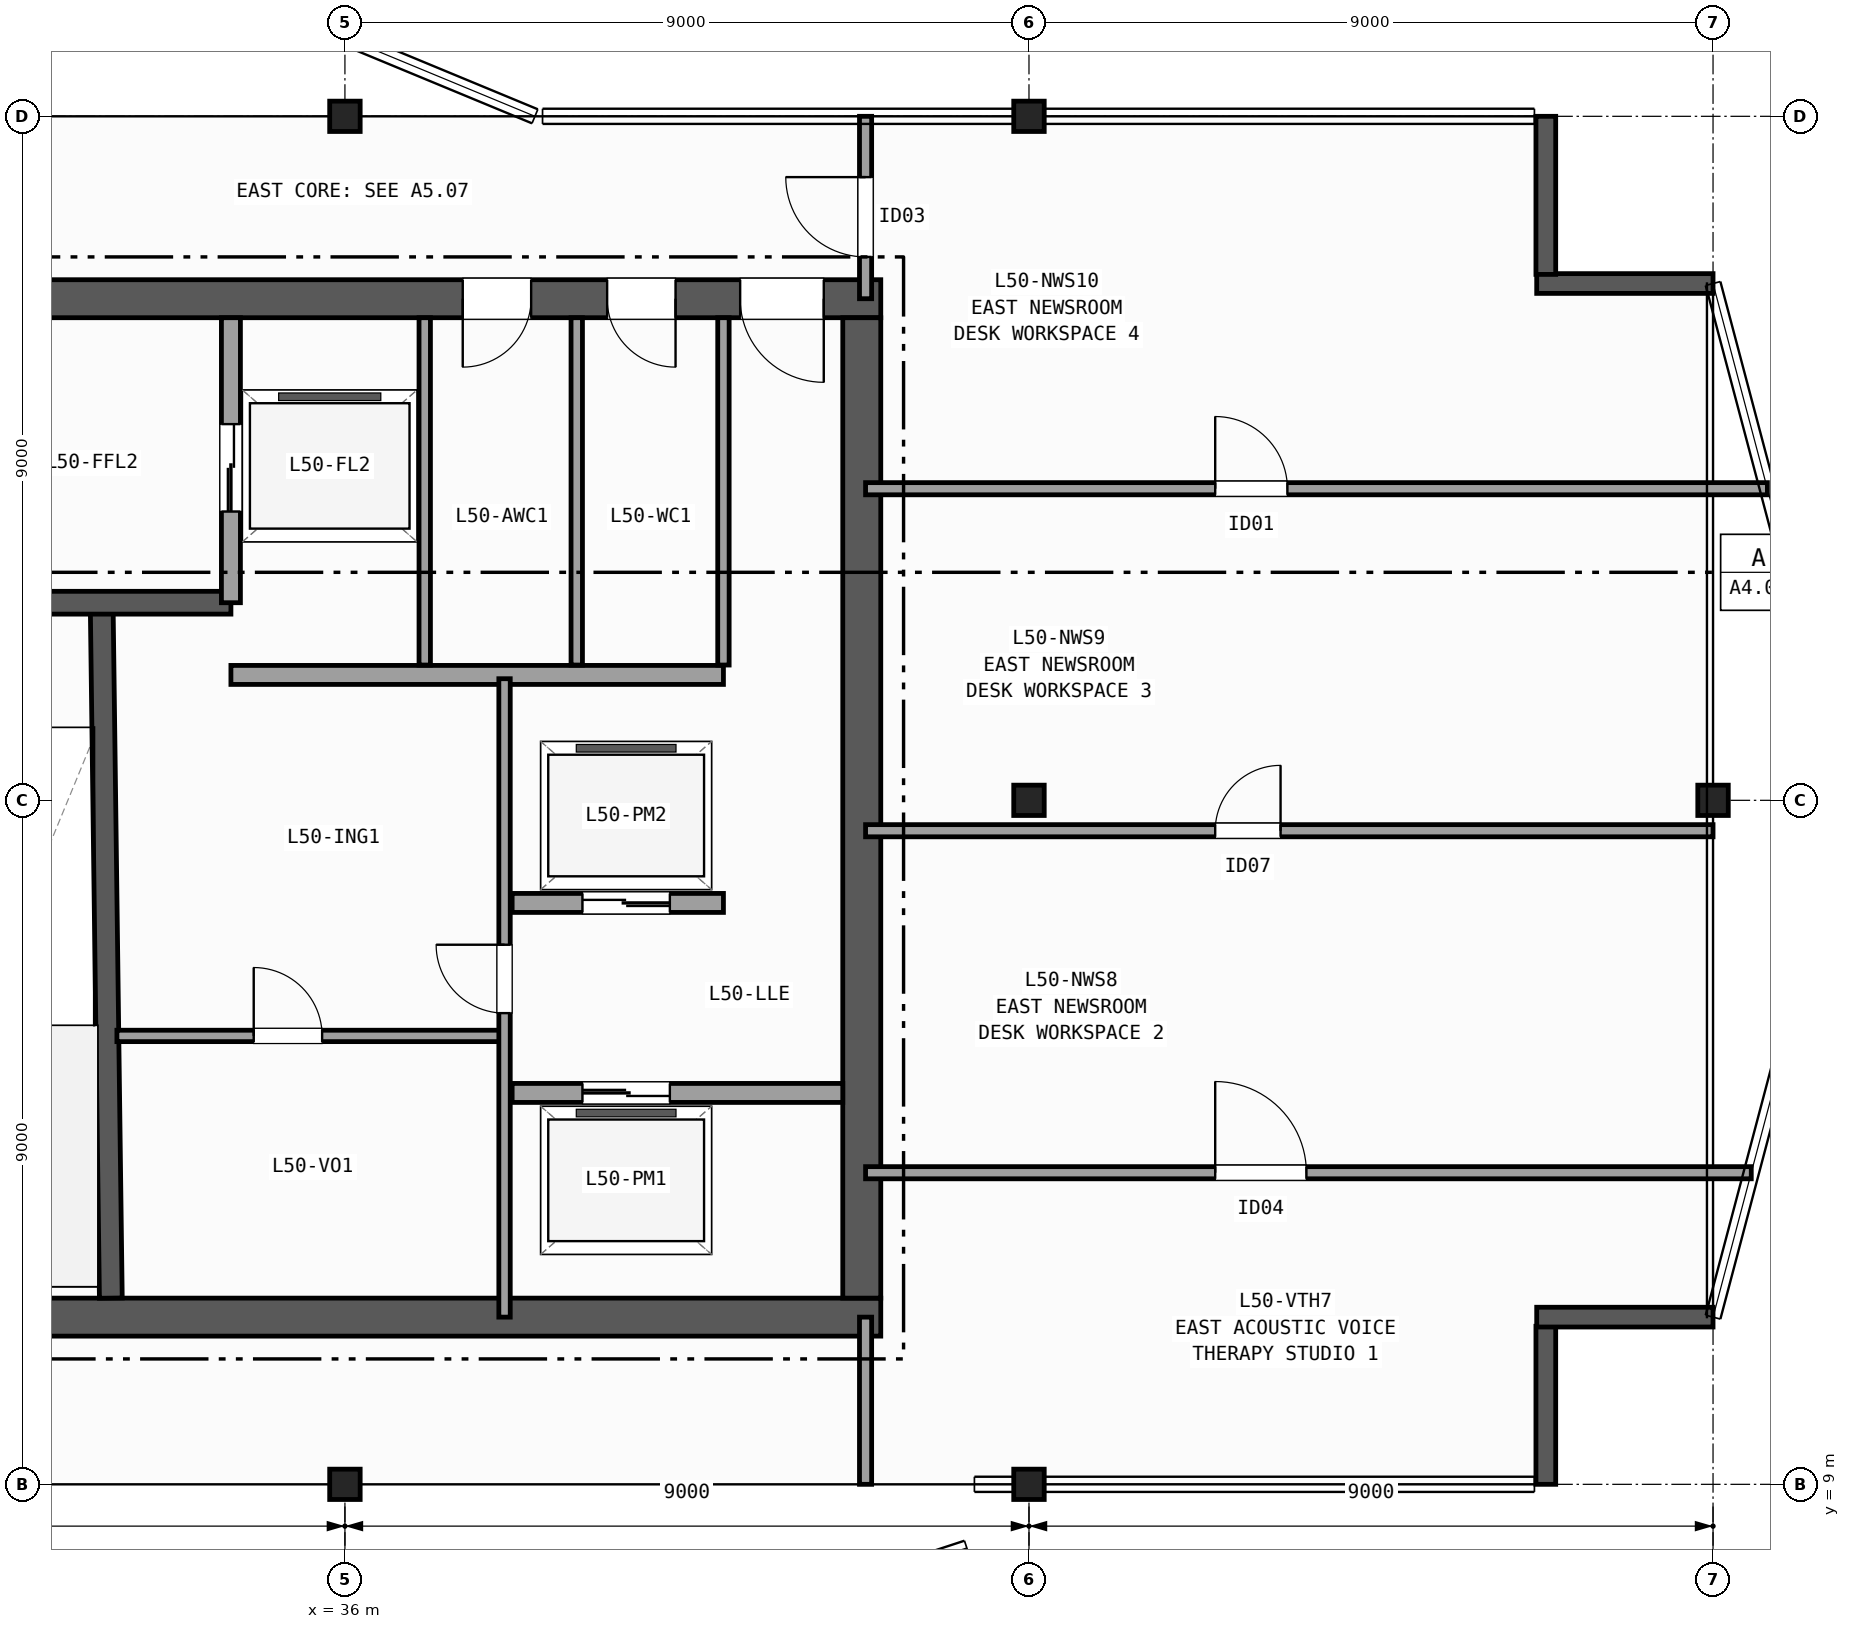
"""IFC4 building model, lengths in metres.
Left out: names, types, materials, properties, quantities, classifications, styles, units other than length and angle.
Written with IfcOpenShell. Run it as: python <this file> out.ifc"""

import sys

from ifc_helpers import new_model, si_unit, direction, frame, frame_2d, origin, origin_2d, place, context, subcontext, project, spatial, rectangle, i_section, extrude, element, fill, save


model = new_model("IFC4")
c1 = context("Model", 3, precision=1e-05, world=origin(), true_north=direction((0.0, 1.0)))
c2 = subcontext(c1, "Body", "Model", "MODEL_VIEW")
j1 = project(units=[si_unit("LENGTHUNIT", "METRE"), si_unit("PLANEANGLEUNIT", "RADIAN")], contexts=[c1])
p1 = place(None, origin())
s1 = spatial("IfcSite", under=j1, at=p1, CompositionType="ELEMENT")
p2 = place(p1, origin())
s2 = spatial("IfcBuilding", under=s1, at=p2, CompositionType="ELEMENT")
p3 = place(p2, frame((0.0, 0.0, 201.2)))
s3 = spatial("IfcBuildingStorey", under=s2, at=p3, CompositionType="ELEMENT", Elevation=201.2)
for number, where, z_axis, x_axis in (
    (1, (36.0, 9.0, 0.0), (0.0, 0.0, 1.0), (1.0, 0.0, 0.0)),
    (2, (36.0, 27.0, 0.0), (0.0, 0.0, 1.0), (1.0, 0.0, 0.0)),
    (3, (45.0, 9.0, 0.0), (0.0, 0.0, 1.0), (1.0, 0.0, 0.0)),
    (4, (45.0, 18.0, 0.0), (0.0, 0.0, 1.0), (1.0, 0.0, 0.0)),
    (5, (45.0, 27.0, 0.0), (0.0, 0.0, 1.0), (1.0, 0.0, 0.0)),
    (6, (54.0, 18.0, 0.0), (0.0, 0.0, 1.0), (1.0, 0.0, 0.0)),
):
    element("IfcColumn", number, at=place(p3, frame(where, z_axis=z_axis, x_axis=x_axis)), inside=s3, PredefinedType="COLUMN", context=c2, shape_type="SweptSolid", body=[
        extrude(i_section(OverallWidth=0.401, OverallDepth=0.399, WebThickness=0.025, FlangeThickness=0.04, FilletRadius=0.015, at=origin_2d()), origin(), (0.0, 0.0, 1.0), 5.0),
    ])
p4 = place(p3, frame((51.8, 9.0, 0.0), z_axis=(0.0, 0.0, 1.0), x_axis=(0.0, 1.0, 0.0)))
e7 = element("IfcWall", 7, at=p4, inside=s3, PredefinedType="SOLIDWALL", context=c2, shape_type="SweptSolid", body=[
    extrude(rectangle(XDim=2.08, YDim=0.26, at=frame_2d((1.04, 0.0))), origin(), (0.0, 0.0, 1.0), 4.72),
])
for number, where, z_axis, x_axis in (
    (8, (51.68, 11.2, 0.0), (0.0, 0.0, 1.0), (1.0, 0.0, 0.0)),
    (9, (54.0, 24.8, 0.0), (0.0, 0.0, 1.0), (-1.0, 0.0, 0.0)),
):
    element("IfcWall", number, at=place(p3, frame(where, z_axis=z_axis, x_axis=x_axis)), inside=s3, PredefinedType="SOLIDWALL", context=c2, shape_type="SweptSolid", body=[
        extrude(rectangle(XDim=2.32, YDim=0.26, at=frame_2d((1.16, 0.0))), origin(), (0.0, 0.0, 1.0), 4.72),
    ])
p5 = place(p3, frame((51.8, 24.92, 0.0), z_axis=(0.0, 0.0, 1.0), x_axis=(0.0, 1.0, 0.0)))
e10 = element("IfcWall", 10, at=p5, inside=s3, PredefinedType="SOLIDWALL", context=c2, shape_type="SweptSolid", body=[
    extrude(rectangle(XDim=2.08, YDim=0.26, at=frame_2d((1.04, 0.0))), origin(), (0.0, 0.0, 1.0), 4.72),
])
p6 = place(p3, frame((29.15, 11.2, 0.0), z_axis=(0.0, 0.0, 1.0), x_axis=(1.0, 0.0, 0.0)))
e11 = element("IfcWall", 11, at=p6, inside=s3, PredefinedType="SHEAR", context=c2, shape_type="SweptSolid", body=[
    extrude(rectangle(XDim=13.9, YDim=0.5, at=frame_2d((6.95, 0.0))), origin(), (0.0, 0.0, 1.0), 4.72),
])
p7 = place(p3, frame((43.05, 24.6, 0.0), z_axis=(0.0, 0.0, 1.0), x_axis=(-1.0, 0.0, 0.0)))
e12 = element("IfcWall", 12, at=p7, inside=s3, PredefinedType="SHEAR", context=c2, shape_type="SweptSolid", body=[
    extrude(rectangle(XDim=13.9, YDim=0.5, at=frame_2d((6.95, 0.0))), origin(), (0.0, 0.0, 1.0), 4.72),
])
p8 = place(p7, frame((0.75, 0.0, 0.0)))
e13 = element("IfcOpeningElement", 13, at=p8, cuts=e12, PredefinedType="OPENING", context=c2, shape_type="SweptSolid", body=[
    extrude(rectangle(XDim=1.1, YDim=2.15, at=frame_2d((0.55, 1.075))), frame((0.0, 0.26, 0.0), z_axis=(0.0, -1.0, 0.0), x_axis=(1.0, 0.0, 0.0)), (0.0, 0.0, 1.0), 0.52),
])
p9 = place(p7, frame((2.7, 0.0, 0.0)))
e14 = element("IfcOpeningElement", 14, at=p9, cuts=e12, PredefinedType="OPENING", context=c2, shape_type="SweptSolid", body=[
    extrude(rectangle(XDim=0.9, YDim=2.1, at=frame_2d((0.45, 1.05))), frame((0.0, 0.26, 0.0), z_axis=(0.0, -1.0, 0.0), x_axis=(1.0, 0.0, 0.0)), (0.0, 0.0, 1.0), 0.52),
])
p10 = place(p7, frame((4.6, 0.0, 0.0)))
e15 = element("IfcOpeningElement", 15, at=p10, cuts=e12, PredefinedType="OPENING", context=c2, shape_type="SweptSolid", body=[
    extrude(rectangle(XDim=0.9, YDim=2.1, at=frame_2d((0.45, 1.05))), frame((0.0, 0.26, 0.0), z_axis=(0.0, -1.0, 0.0), x_axis=(1.0, 0.0, 0.0)), (0.0, 0.0, 1.0), 0.52),
])
p11 = place(p3, frame((42.8, 11.45, 0.0), z_axis=(0.0, 0.0, 1.0), x_axis=(0.0, 1.0, 0.0)))
e16 = element("IfcWall", 16, at=p11, inside=s3, PredefinedType="SHEAR", context=c2, shape_type="SweptSolid", body=[
    extrude(rectangle(XDim=12.9, YDim=0.5, at=frame_2d((6.45, 0.0))), origin(), (0.0, 0.0, 1.0), 4.72),
])
p12 = place(p3, frame((32.92, 11.45, 0.0), z_axis=(0.0, 0.0, 1.0), x_axis=(-0.013171578211, 0.999913251001, 0.0)))
e17 = element("IfcWall", 17, at=p12, inside=s3, PredefinedType="SHEAR", context=c2, shape_type="SweptSolid", body=[
    extrude(rectangle(XDim=9.101, YDim=0.3, at=frame_2d((4.55, 0.0))), origin(), (0.0, 0.0, 1.0), 4.72),
])
p13 = place(p3, frame((34.5, 20.6, 0.0), z_axis=(0.0, 0.0, 1.0), x_axis=(-1.0, 0.0, 0.0)))
e18 = element("IfcWall", 18, at=p13, inside=s3, PredefinedType="SHEAR", context=c2, shape_type="SweptSolid", body=[
    extrude(rectangle(XDim=4.85, YDim=0.3, at=frame_2d((2.425, 0.0))), origin(), (0.0, 0.0, 1.0), 4.72),
])
p14 = place(p13, frame((2.7, 0.0, 0.0)))
e19 = element("IfcOpeningElement", 19, at=p14, cuts=e18, PredefinedType="OPENING", context=c2, shape_type="SweptSolid", body=[
    extrude(rectangle(XDim=1.2, YDim=2.15, at=frame_2d((0.6, 1.075))), frame((0.0, 0.16, 0.0), z_axis=(0.0, -1.0, 0.0), x_axis=(1.0, 0.0, 0.0)), (0.0, 0.0, 1.0), 0.32),
])
p15 = place(p3, frame((34.5, 20.6, 0.0), z_axis=(0.0, 0.0, 1.0), x_axis=(0.0, 1.0, 0.0)))
e20 = element("IfcWall", 20, at=p15, inside=s3, PredefinedType="PARTITIONING", context=c2, shape_type="SweptSolid", body=[
    extrude(rectangle(XDim=3.75, YDim=0.25, at=frame_2d((1.875, 0.0))), origin(), (0.0, 0.0, 1.0), 4.72),
])
p16 = place(p15, frame((1.2, 0.0, 0.0)))
e21 = element("IfcOpeningElement", 21, at=p16, cuts=e20, PredefinedType="OPENING", context=c2, shape_type="SweptSolid", body=[
    extrude(rectangle(XDim=1.15, YDim=2.15, at=frame_2d((0.575, 1.075))), frame((0.0, 0.135, 0.0), z_axis=(0.0, -1.0, 0.0), x_axis=(1.0, 0.0, 0.0)), (0.0, 0.0, 1.0), 0.27),
])
p17 = place(p3, frame((34.5, 19.65, 0.0), z_axis=(0.0, 0.0, 1.0), x_axis=(1.0, 0.0, 0.0)))
e22 = element("IfcWall", 22, at=p17, inside=s3, PredefinedType="PARTITIONING", context=c2, shape_type="SweptSolid", body=[
    extrude(rectangle(XDim=6.48, YDim=0.25, at=frame_2d((3.24, 0.0))), origin(), (0.0, 0.0, 1.0), 4.72),
])
p18 = place(p3, frame((38.2, 14.15, 0.0), z_axis=(0.0, 0.0, 1.0), x_axis=(1.0, 0.0, 0.0)))
e23 = element("IfcWall", 23, at=p18, inside=s3, PredefinedType="PARTITIONING", context=c2, shape_type="SweptSolid", body=[
    extrude(rectangle(XDim=4.35, YDim=0.25, at=frame_2d((2.175, 0.0))), origin(), (0.0, 0.0, 1.0), 4.72),
])
p19 = place(p18, frame((0.925, 0.0, 0.0)))
e24 = element("IfcOpeningElement", 24, at=p19, cuts=e23, PredefinedType="OPENING", context=c2, shape_type="SweptSolid", body=[
    extrude(rectangle(XDim=1.15, YDim=2.15, at=frame_2d((0.575, 1.075))), frame((0.0, 0.135, 0.0), z_axis=(0.0, -1.0, 0.0), x_axis=(1.0, 0.0, 0.0)), (0.0, 0.0, 1.0), 0.27),
])
p20 = place(p3, frame((40.98, 16.65, 0.0), z_axis=(0.0, 0.0, 1.0), x_axis=(-1.0, 0.0, 0.0)))
e25 = element("IfcWall", 25, at=p20, inside=s3, PredefinedType="PARTITIONING", context=c2, shape_type="SweptSolid", body=[
    extrude(rectangle(XDim=2.78, YDim=0.25, at=frame_2d((1.39, 0.0))), origin(), (0.0, 0.0, 1.0), 4.72),
])
p21 = place(p20, frame((0.705, 0.0, 0.0)))
e26 = element("IfcOpeningElement", 26, at=p21, cuts=e25, PredefinedType="OPENING", context=c2, shape_type="SweptSolid", body=[
    extrude(rectangle(XDim=1.15, YDim=2.15, at=frame_2d((0.575, 1.075))), frame((0.0, 0.135, 0.0), z_axis=(0.0, -1.0, 0.0), x_axis=(1.0, 0.0, 0.0)), (0.0, 0.0, 1.0), 0.27),
])
p22 = place(p3, frame((33.0, 14.9, 0.0), z_axis=(0.0, 0.0, 1.0), x_axis=(1.0, 0.0, 0.0)))
e27 = element("IfcWall", 27, at=p22, inside=s3, PredefinedType="PARTITIONING", context=c2, shape_type="SweptSolid", body=[
    extrude(rectangle(XDim=5.1, YDim=0.15, at=frame_2d((2.55, 0.0))), origin(), (0.0, 0.0, 1.0), 4.72),
])
p23 = place(p22, frame((1.8, 0.0, 0.0)))
e28 = element("IfcOpeningElement", 28, at=p23, cuts=e27, PredefinedType="OPENING", context=c2, shape_type="SweptSolid", body=[
    extrude(rectangle(XDim=0.9, YDim=2.1, at=frame_2d((0.45, 1.05))), frame((0.0, 0.085, 0.0), z_axis=(0.0, -1.0, 0.0), x_axis=(1.0, 0.0, 0.0)), (0.0, 0.0, 1.0), 0.17),
])
p24 = place(p3, frame((38.1, 11.2, 0.0), z_axis=(0.0, 0.0, 1.0), x_axis=(0.0, 1.0, 0.0)))
e29 = element("IfcWall", 29, at=p24, inside=s3, PredefinedType="PARTITIONING", context=c2, shape_type="SweptSolid", body=[
    extrude(rectangle(XDim=8.4, YDim=0.15, at=frame_2d((4.2, 0.0))), origin(), (0.0, 0.0, 1.0), 4.72),
])
p25 = place(p24, frame((4.0, 0.0, 0.0)))
e30 = element("IfcOpeningElement", 30, at=p25, cuts=e29, PredefinedType="OPENING", context=c2, shape_type="SweptSolid", body=[
    extrude(rectangle(XDim=0.9, YDim=2.1, at=frame_2d((0.45, 1.05))), frame((0.0, 0.085, 0.0), z_axis=(0.0, -1.0, 0.0), x_axis=(1.0, 0.0, 0.0)), (0.0, 0.0, 1.0), 0.17),
])
for number, where, z_axis, x_axis in (
    (31, (37.05, 19.78, 0.0), (0.0, 0.0, 1.0), (0.0, 1.0, 0.0)),
    (32, (39.05, 19.78, 0.0), (0.0, 0.0, 1.0), (0.0, 1.0, 0.0)),
    (33, (40.98, 19.78, 0.0), (0.0, 0.0, 1.0), (0.0, 1.0, 0.0)),
):
    element("IfcWall", number, at=place(p3, frame(where, z_axis=z_axis, x_axis=x_axis)), inside=s3, PredefinedType="PARTITIONING", context=c2, shape_type="SweptSolid", body=[
        extrude(rectangle(XDim=4.57, YDim=0.15, at=frame_2d((2.285, 0.0))), origin(), (0.0, 0.0, 1.0), 4.72),
    ])
p26 = place(p3, frame((42.85, 9.0, 0.0), z_axis=(0.0, 0.0, 1.0), x_axis=(0.0, 1.0, 0.0)))
e34 = element("IfcWall", 34, at=p26, inside=s3, PredefinedType="PARTITIONING", context=c2, shape_type="SweptSolid", body=[
    extrude(rectangle(XDim=2.2, YDim=0.16, at=frame_2d((1.1, 0.0))), origin(), (0.0, 0.0, 1.0), 4.007),
])
p27 = place(p3, frame((42.85, 24.6, 0.0), z_axis=(0.0, 0.0, 1.0), x_axis=(0.0, 1.0, 0.0)))
e35 = element("IfcWall", 35, at=p27, inside=s3, PredefinedType="PARTITIONING", context=c2, shape_type="SweptSolid", body=[
    extrude(rectangle(XDim=2.4, YDim=0.16, at=frame_2d((1.2, 0.0))), origin(), (0.0, 0.0, 1.0), 4.007),
])
p28 = place(p27, frame((0.55, 0.0, 0.0)))
e36 = element("IfcOpeningElement", 36, at=p28, cuts=e35, PredefinedType="OPENING", context=c2, shape_type="SweptSolid", body=[
    extrude(rectangle(XDim=1.05, YDim=2.15, at=frame_2d((0.525, 1.075))), frame((0.0, 0.09, 0.0), z_axis=(0.0, -1.0, 0.0), x_axis=(1.0, 0.0, 0.0)), (0.0, 0.0, 1.0), 0.18),
])
p29 = place(p3, frame((42.85, 13.1, 0.0), z_axis=(0.0, 0.0, 1.0), x_axis=(1.0, 0.0, 0.0)))
e37 = element("IfcWall", 37, at=p29, inside=s3, PredefinedType="PARTITIONING", context=c2, shape_type="SweptSolid", body=[
    extrude(rectangle(XDim=11.653, YDim=0.16, at=frame_2d((5.826, 0.0))), origin(), (0.0, 0.0, 1.0), 4.72),
])
p30 = place(p29, frame((4.6, 0.0, 0.0)))
e38 = element("IfcOpeningElement", 38, at=p30, cuts=e37, PredefinedType="OPENING", context=c2, shape_type="SweptSolid", body=[
    extrude(rectangle(XDim=1.2, YDim=2.15, at=frame_2d((0.6, 1.075))), frame((0.0, 0.09, 0.0), z_axis=(0.0, -1.0, 0.0), x_axis=(1.0, 0.0, 0.0)), (0.0, 0.0, 1.0), 0.18),
])
p31 = place(p3, frame((42.85, 17.6, 0.0), z_axis=(0.0, 0.0, 1.0), x_axis=(1.0, 0.0, 0.0)))
e39 = element("IfcWall", 39, at=p31, inside=s3, PredefinedType="PARTITIONING", context=c2, shape_type="SweptSolid", body=[
    extrude(rectangle(XDim=11.15, YDim=0.16, at=frame_2d((5.575, 0.0))), origin(), (0.0, 0.0, 1.0), 4.72),
])
p32 = place(p31, frame((4.6, 0.0, 0.0)))
e40 = element("IfcOpeningElement", 40, at=p32, cuts=e39, PredefinedType="OPENING", context=c2, shape_type="SweptSolid", body=[
    extrude(rectangle(XDim=0.86, YDim=2.05, at=frame_2d((0.43, 1.025))), frame((0.0, 0.09, 0.0), z_axis=(0.0, -1.0, 0.0), x_axis=(1.0, 0.0, 0.0)), (0.0, 0.0, 1.0), 0.18),
])
p33 = place(p3, frame((42.85, 22.1, 0.0), z_axis=(0.0, 0.0, 1.0), x_axis=(1.0, 0.0, 0.0)))
e41 = element("IfcWall", 41, at=p33, inside=s3, PredefinedType="PARTITIONING", context=c2, shape_type="SweptSolid", body=[
    extrude(rectangle(XDim=11.865, YDim=0.16, at=frame_2d((5.933, 0.0))), origin(), (0.0, 0.0, 1.0), 4.72),
])
p34 = place(p33, frame((4.6, 0.0, 0.0)))
e42 = element("IfcOpeningElement", 42, at=p34, cuts=e41, PredefinedType="OPENING", context=c2, shape_type="SweptSolid", body=[
    extrude(rectangle(XDim=0.95, YDim=2.1, at=frame_2d((0.475, 1.05))), frame((0.0, 0.09, 0.0), z_axis=(0.0, -1.0, 0.0), x_axis=(1.0, 0.0, 0.0)), (0.0, 0.0, 1.0), 0.18),
])
p35 = place(p8, origin())
e43 = element("IfcDoor", 43, at=p35, inside=s3, OperationType="SINGLE_SWING_LEFT", PredefinedType="DOOR", context=c2, shape_type="SweptSolid", body=[
    extrude(rectangle(XDim=1.1, YDim=2.15, at=frame_2d((0.55, 1.075))), frame((0.0, 0.025, 0.0), z_axis=(0.0, -1.0, 0.0), x_axis=(1.0, 0.0, 0.0)), (0.0, 0.0, 1.0), 0.05),
])
fill(e13, e43)
p36 = place(p9, origin())
e44 = element("IfcDoor", 44, at=p36, inside=s3, OperationType="SINGLE_SWING_LEFT", PredefinedType="DOOR", context=c2, shape_type="SweptSolid", body=[
    extrude(rectangle(XDim=0.9, YDim=2.1, at=frame_2d((0.45, 1.05))), frame((0.0, 0.025, 0.0), z_axis=(0.0, -1.0, 0.0), x_axis=(1.0, 0.0, 0.0)), (0.0, 0.0, 1.0), 0.05),
])
fill(e14, e44)
p37 = place(p10, origin())
e45 = element("IfcDoor", 45, at=p37, inside=s3, OperationType="SINGLE_SWING_RIGHT", PredefinedType="DOOR", context=c2, shape_type="SweptSolid", body=[
    extrude(rectangle(XDim=0.9, YDim=2.1, at=frame_2d((0.45, 1.05))), frame((0.0, 0.025, 0.0), z_axis=(0.0, -1.0, 0.0), x_axis=(1.0, 0.0, 0.0)), (0.0, 0.0, 1.0), 0.05),
])
fill(e15, e45)
p38 = place(p16, origin())
e46 = element("IfcDoor", 46, at=p38, inside=s3, OperationType="DOUBLE_DOOR_SLIDING", PredefinedType="DOOR", context=c2, shape_type="SweptSolid", body=[
    extrude(rectangle(XDim=1.15, YDim=2.15, at=frame_2d((0.575, 1.075))), frame((0.0, 0.025, 0.0), z_axis=(0.0, -1.0, 0.0), x_axis=(1.0, 0.0, 0.0)), (0.0, 0.0, 1.0), 0.05),
])
fill(e21, e46)
p39 = place(p19, origin())
e47 = element("IfcDoor", 47, at=p39, inside=s3, OperationType="DOUBLE_DOOR_SLIDING", PredefinedType="DOOR", context=c2, shape_type="SweptSolid", body=[
    extrude(rectangle(XDim=1.15, YDim=2.15, at=frame_2d((0.575, 1.075))), frame((0.0, 0.025, 0.0), z_axis=(0.0, -1.0, 0.0), x_axis=(1.0, 0.0, 0.0)), (0.0, 0.0, 1.0), 0.05),
])
fill(e24, e47)
p40 = place(p21, origin())
e48 = element("IfcDoor", 48, at=p40, inside=s3, OperationType="DOUBLE_DOOR_SLIDING", PredefinedType="DOOR", context=c2, shape_type="SweptSolid", body=[
    extrude(rectangle(XDim=1.15, YDim=2.15, at=frame_2d((0.575, 1.075))), frame((0.0, 0.025, 0.0), z_axis=(0.0, -1.0, 0.0), x_axis=(1.0, 0.0, 0.0)), (0.0, 0.0, 1.0), 0.05),
])
fill(e26, e48)
p41 = place(p25, origin())
e49 = element("IfcDoor", 49, at=p41, inside=s3, OperationType="SINGLE_SWING_RIGHT", PredefinedType="DOOR", context=c2, shape_type="SweptSolid", body=[
    extrude(rectangle(XDim=0.9, YDim=2.1, at=frame_2d((0.45, 1.05))), frame((0.0, 0.025, 0.0), z_axis=(0.0, -1.0, 0.0), x_axis=(1.0, 0.0, 0.0)), (0.0, 0.0, 1.0), 0.05),
])
fill(e30, e49)
p42 = place(p23, origin())
e50 = element("IfcDoor", 50, at=p42, inside=s3, OperationType="SINGLE_SWING_LEFT", PredefinedType="DOOR", context=c2, shape_type="SweptSolid", body=[
    extrude(rectangle(XDim=0.9, YDim=2.1, at=frame_2d((0.45, 1.05))), frame((0.0, 0.025, 0.0), z_axis=(0.0, -1.0, 0.0), x_axis=(1.0, 0.0, 0.0)), (0.0, 0.0, 1.0), 0.05),
])
fill(e28, e50)
p43 = place(p28, origin())
e51 = element("IfcDoor", 51, at=p43, inside=s3, OperationType="SINGLE_SWING_RIGHT", PredefinedType="DOOR", context=c2, shape_type="SweptSolid", body=[
    extrude(rectangle(XDim=1.05, YDim=2.15, at=frame_2d((0.525, 1.075))), frame((0.0, 0.025, 0.0), z_axis=(0.0, -1.0, 0.0), x_axis=(1.0, 0.0, 0.0)), (0.0, 0.0, 1.0), 0.05),
])
fill(e36, e51)
p44 = place(p30, origin())
e52 = element("IfcDoor", 52, at=p44, inside=s3, OperationType="SINGLE_SWING_LEFT", PredefinedType="DOOR", context=c2, shape_type="SweptSolid", body=[
    extrude(rectangle(XDim=1.2, YDim=2.15, at=frame_2d((0.6, 1.075))), frame((0.0, 0.025, 0.0), z_axis=(0.0, -1.0, 0.0), x_axis=(1.0, 0.0, 0.0)), (0.0, 0.0, 1.0), 0.05),
])
fill(e38, e52)
p45 = place(p32, origin())
e53 = element("IfcDoor", 53, at=p45, inside=s3, OperationType="SINGLE_SWING_RIGHT", PredefinedType="DOOR", context=c2, shape_type="SweptSolid", body=[
    extrude(rectangle(XDim=0.86, YDim=2.05, at=frame_2d((0.43, 1.025))), frame((0.0, 0.025, 0.0), z_axis=(0.0, -1.0, 0.0), x_axis=(1.0, 0.0, 0.0)), (0.0, 0.0, 1.0), 0.05),
])
fill(e40, e53)
p46 = place(p34, origin())
e54 = element("IfcDoor", 54, at=p46, inside=s3, OperationType="SINGLE_SWING_LEFT", PredefinedType="DOOR", context=c2, shape_type="SweptSolid", body=[
    extrude(rectangle(XDim=0.95, YDim=2.1, at=frame_2d((0.475, 1.05))), frame((0.0, 0.025, 0.0), z_axis=(0.0, -1.0, 0.0), x_axis=(1.0, 0.0, 0.0)), (0.0, 0.0, 1.0), 0.05),
])
fill(e42, e54)
save(model, sys.argv[1])
